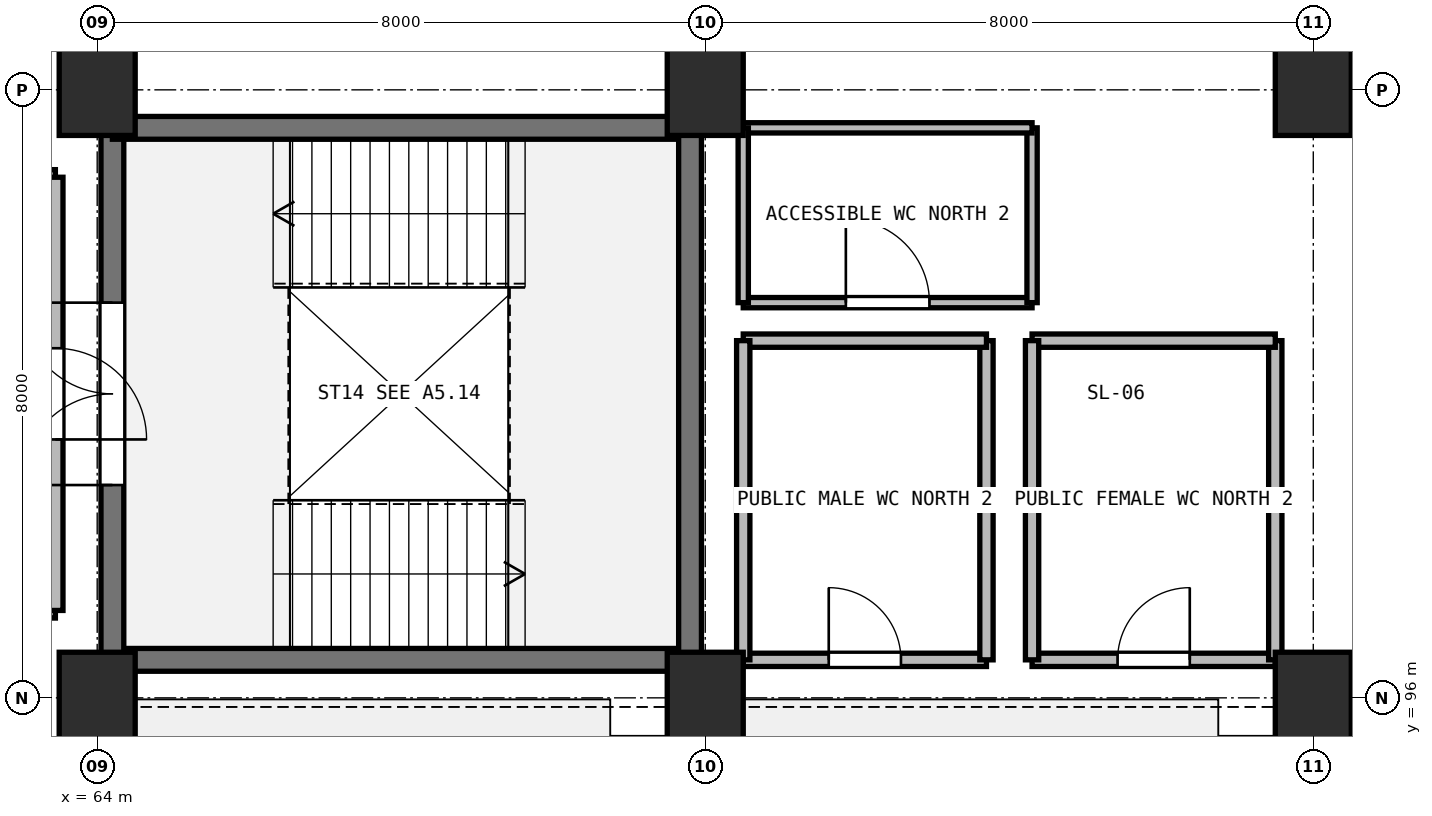
"""IFC4 building model, lengths in metres.
Left out: names, types, materials, properties, quantities, classifications, styles, units other than length and angle.
Written with IfcOpenShell. Run it as: python <this file> out.ifc"""

import sys

from ifc_helpers import new_model, si_unit, direction, frame, frame_2d, origin, origin_2d, place, context, subcontext, project, spatial, rectangle, extrude, element, fill, save


model = new_model("IFC4")
c1 = context("Model", 3, precision=1e-05, world=origin(), true_north=direction((0.0, 1.0)))
c2 = subcontext(c1, "Body", "Model", "MODEL_VIEW")
j1 = project(units=[si_unit("LENGTHUNIT", "METRE"), si_unit("PLANEANGLEUNIT", "RADIAN")], contexts=[c1])
p1 = place(None, origin())
s1 = spatial("IfcSite", under=j1, at=p1, CompositionType="ELEMENT")
p2 = place(p1, origin())
s2 = spatial("IfcBuilding", under=s1, at=p2, CompositionType="ELEMENT")
p3 = place(p2, frame((0.0, 0.0, 15.0)))
s3 = spatial("IfcBuildingStorey", under=s2, at=p3, CompositionType="ELEMENT", Elevation=15.0)
for number, where, z_axis, x_axis in (
    (1, (64.0, 96.0, 0.0), (0.0, 0.0, 1.0), (1.0, 0.0, 0.0)),
    (2, (64.0, 104.0, 0.0), (0.0, 0.0, 1.0), (1.0, 0.0, 0.0)),
    (3, (72.0, 96.0, 0.0), (0.0, 0.0, 1.0), (1.0, 0.0, 0.0)),
    (4, (72.0, 104.0, 0.0), (0.0, 0.0, 1.0), (1.0, 0.0, 0.0)),
    (5, (80.0, 96.0, 0.0), (0.0, 0.0, 1.0), (1.0, 0.0, 0.0)),
    (6, (80.0, 104.0, 0.0), (0.0, 0.0, 1.0), (1.0, 0.0, 0.0)),
):
    element("IfcColumn", number, at=place(p3, frame(where, z_axis=z_axis, x_axis=x_axis)), inside=s3, PredefinedType="COLUMN", context=c2, shape_type="SweptSolid", body=[
        extrude(rectangle(XDim=1.0, YDim=1.2, at=origin_2d()), origin(), (0.0, 0.0, 1.0), 4.8),
    ])
p4 = place(p3, frame((71.8, 96.5, 0.0), z_axis=(0.0, 0.0, 1.0), x_axis=(-1.0, 0.0, 0.0)))
e7 = element("IfcWall", 7, at=p4, inside=s3, PredefinedType="SHEAR", context=c2, shape_type="SweptSolid", body=[
    extrude(rectangle(XDim=7.6, YDim=0.3, at=frame_2d((3.8, 0.0))), origin(), (0.0, 0.0, 1.0), 4.5),
])
p5 = place(p3, frame((64.2, 96.5, 0.0), z_axis=(0.0, 0.0, 1.0), x_axis=(0.0, 1.0, 0.0)))
e8 = element("IfcWall", 8, at=p5, inside=s3, PredefinedType="SHEAR", context=c2, shape_type="SweptSolid", body=[
    extrude(rectangle(XDim=7.0, YDim=0.3, at=frame_2d((3.5, 0.0))), origin(), (0.0, 0.0, 1.0), 4.5),
])
p6 = place(p5, frame((2.3, 0.0, 0.0)))
e9 = element("IfcOpeningElement", 9, at=p6, cuts=e8, PredefinedType="OPENING", context=c2, shape_type="SweptSolid", body=[
    extrude(rectangle(XDim=2.4, YDim=2.2, at=frame_2d((1.2, 1.1))), frame((0.0, 0.16, 0.0), z_axis=(0.0, -1.0, 0.0), x_axis=(1.0, 0.0, 0.0)), (0.0, 0.0, 1.0), 0.32),
])
p7 = place(p3, frame((64.2, 103.5, 0.0), z_axis=(0.0, 0.0, 1.0), x_axis=(1.0, 0.0, 0.0)))
e10 = element("IfcWall", 10, at=p7, inside=s3, PredefinedType="SHEAR", context=c2, shape_type="SweptSolid", body=[
    extrude(rectangle(XDim=7.6, YDim=0.3, at=frame_2d((3.8, 0.0))), origin(), (0.0, 0.0, 1.0), 4.5),
])
p8 = place(p3, frame((71.8, 103.5, 0.0), z_axis=(0.0, 0.0, 1.0), x_axis=(0.0, -1.0, 0.0)))
e11 = element("IfcWall", 11, at=p8, inside=s3, PredefinedType="SHEAR", context=c2, shape_type="SweptSolid", body=[
    extrude(rectangle(XDim=7.0, YDim=0.3, at=frame_2d((3.5, 0.0))), origin(), (0.0, 0.0, 1.0), 4.5),
])
for number, where, z_axis, x_axis in (
    (12, (59.35, 102.85, 0.0), (0.0, 0.0, 1.0), (1.0, 0.0, 0.0)),
    (13, (63.45, 97.15, 0.0), (0.0, 0.0, 1.0), (-1.0, 0.0, 0.0)),
):
    element("IfcWall", number, at=place(p3, frame(where, z_axis=z_axis, x_axis=x_axis)), inside=s3, PredefinedType="PARTITIONING", context=c2, shape_type="SweptSolid", body=[
        extrude(rectangle(XDim=4.1, YDim=0.2, at=frame_2d((2.05, 0.0))), origin(), (0.0, 0.0, 1.0), 4.5),
    ])
p9 = place(p3, frame((63.45, 102.85, 0.0), z_axis=(0.0, 0.0, 1.0), x_axis=(0.0, -1.0, 0.0)))
e14 = element("IfcWall", 14, at=p9, inside=s3, PredefinedType="PARTITIONING", context=c2, shape_type="SweptSolid", body=[
    extrude(rectangle(XDim=5.7, YDim=0.2, at=frame_2d((2.85, 0.0))), origin(), (0.0, 0.0, 1.0), 3.6),
])
p10 = place(p9, frame((2.25, 0.0, 0.0)))
e15 = element("IfcOpeningElement", 15, at=p10, cuts=e14, PredefinedType="OPENING", context=c2, shape_type="SweptSolid", body=[
    extrude(rectangle(XDim=1.2, YDim=2.2, at=frame_2d((0.6, 1.1))), frame((0.0, 0.11, 0.0), z_axis=(0.0, -1.0, 0.0), x_axis=(1.0, 0.0, 0.0)), (0.0, 0.0, 1.0), 0.22),
])
p11 = place(p3, frame((72.5, 96.5, 0.0), z_axis=(0.0, 0.0, 1.0), x_axis=(1.0, 0.0, 0.0)))
e16 = element("IfcWall", 16, at=p11, inside=s3, PredefinedType="PARTITIONING", context=c2, shape_type="SweptSolid", body=[
    extrude(rectangle(XDim=3.2, YDim=0.175, at=frame_2d((1.6, 0.0))), origin(), (0.0, 0.0, 1.0), 3.6),
])
p12 = place(p11, frame((1.125, 0.0, 0.0)))
e17 = element("IfcOpeningElement", 17, at=p12, cuts=e16, PredefinedType="OPENING", context=c2, shape_type="SweptSolid", body=[
    extrude(rectangle(XDim=0.95, YDim=2.15, at=frame_2d((0.475, 1.075))), frame((0.0, 0.098, 0.0), z_axis=(0.0, -1.0, 0.0), x_axis=(1.0, 0.0, 0.0)), (0.0, 0.0, 1.0), 0.195),
])
p13 = place(p3, frame((75.7, 96.5, 0.0), z_axis=(0.0, 0.0, 1.0), x_axis=(0.0, 1.0, 0.0)))
e18 = element("IfcWall", 18, at=p13, inside=s3, PredefinedType="PARTITIONING", context=c2, shape_type="SweptSolid", body=[
    extrude(rectangle(XDim=4.2, YDim=0.175, at=frame_2d((2.1, 0.0))), origin(), (0.0, 0.0, 1.0), 4.5),
])
p14 = place(p3, frame((75.7, 100.7, 0.0), z_axis=(0.0, 0.0, 1.0), x_axis=(-1.0, 0.0, 0.0)))
e19 = element("IfcWall", 19, at=p14, inside=s3, PredefinedType="PARTITIONING", context=c2, shape_type="SweptSolid", body=[
    extrude(rectangle(XDim=3.2, YDim=0.175, at=frame_2d((1.6, 0.0))), origin(), (0.0, 0.0, 1.0), 4.5),
])
p15 = place(p3, frame((72.5, 100.7, 0.0), z_axis=(0.0, 0.0, 1.0), x_axis=(0.0, -1.0, 0.0)))
e20 = element("IfcWall", 20, at=p15, inside=s3, PredefinedType="PARTITIONING", context=c2, shape_type="SweptSolid", body=[
    extrude(rectangle(XDim=4.2, YDim=0.175, at=frame_2d((2.1, 0.0))), origin(), (0.0, 0.0, 1.0), 3.6),
])
p16 = place(p3, frame((76.3, 96.5, 0.0), z_axis=(0.0, 0.0, 1.0), x_axis=(1.0, 0.0, 0.0)))
e21 = element("IfcWall", 21, at=p16, inside=s3, PredefinedType="PARTITIONING", context=c2, shape_type="SweptSolid", body=[
    extrude(rectangle(XDim=3.2, YDim=0.175, at=frame_2d((1.6, 0.0))), origin(), (0.0, 0.0, 1.0), 3.6),
])
p17 = place(p16, frame((1.125, 0.0, 0.0)))
e22 = element("IfcOpeningElement", 22, at=p17, cuts=e21, PredefinedType="OPENING", context=c2, shape_type="SweptSolid", body=[
    extrude(rectangle(XDim=0.95, YDim=2.15, at=frame_2d((0.475, 1.075))), frame((0.0, 0.098, 0.0), z_axis=(0.0, -1.0, 0.0), x_axis=(1.0, 0.0, 0.0)), (0.0, 0.0, 1.0), 0.195),
])
p18 = place(p3, frame((79.5, 96.5, 0.0), z_axis=(0.0, 0.0, 1.0), x_axis=(0.0, 1.0, 0.0)))
e23 = element("IfcWall", 23, at=p18, inside=s3, PredefinedType="PARTITIONING", context=c2, shape_type="SweptSolid", body=[
    extrude(rectangle(XDim=4.2, YDim=0.175, at=frame_2d((2.1, 0.0))), origin(), (0.0, 0.0, 1.0), 3.6),
])
p19 = place(p3, frame((79.5, 100.7, 0.0), z_axis=(0.0, 0.0, 1.0), x_axis=(-1.0, 0.0, 0.0)))
e24 = element("IfcWall", 24, at=p19, inside=s3, PredefinedType="PARTITIONING", context=c2, shape_type="SweptSolid", body=[
    extrude(rectangle(XDim=3.2, YDim=0.175, at=frame_2d((1.6, 0.0))), origin(), (0.0, 0.0, 1.0), 4.5),
])
p20 = place(p3, frame((76.3, 100.7, 0.0), z_axis=(0.0, 0.0, 1.0), x_axis=(0.0, -1.0, 0.0)))
e25 = element("IfcWall", 25, at=p20, inside=s3, PredefinedType="PARTITIONING", context=c2, shape_type="SweptSolid", body=[
    extrude(rectangle(XDim=4.2, YDim=0.175, at=frame_2d((2.1, 0.0))), origin(), (0.0, 0.0, 1.0), 4.5),
])
p21 = place(p3, frame((72.5, 101.2, 0.0), z_axis=(0.0, 0.0, 1.0), x_axis=(1.0, 0.0, 0.0)))
e26 = element("IfcWall", 26, at=p21, inside=s3, PredefinedType="PARTITIONING", context=c2, shape_type="SweptSolid", body=[
    extrude(rectangle(XDim=3.8, YDim=0.135, at=frame_2d((1.9, 0.0))), origin(), (0.0, 0.0, 1.0), 4.5),
])
p22 = place(p21, frame((1.35, 0.0, 0.0)))
e27 = element("IfcOpeningElement", 27, at=p22, cuts=e26, PredefinedType="OPENING", context=c2, shape_type="SweptSolid", body=[
    extrude(rectangle(XDim=1.1, YDim=2.15, at=frame_2d((0.55, 1.075))), frame((0.0, 0.078, 0.0), z_axis=(0.0, -1.0, 0.0), x_axis=(1.0, 0.0, 0.0)), (0.0, 0.0, 1.0), 0.155),
])
p23 = place(p3, frame((76.3, 101.2, 0.0), z_axis=(0.0, 0.0, 1.0), x_axis=(0.0, 1.0, 0.0)))
e28 = element("IfcWall", 28, at=p23, inside=s3, PredefinedType="PARTITIONING", context=c2, shape_type="SweptSolid", body=[
    extrude(rectangle(XDim=2.3, YDim=0.135, at=frame_2d((1.15, 0.0))), origin(), (0.0, 0.0, 1.0), 4.5),
])
p24 = place(p3, frame((76.3, 103.5, 0.0), z_axis=(0.0, 0.0, 1.0), x_axis=(-1.0, 0.0, 0.0)))
e29 = element("IfcWall", 29, at=p24, inside=s3, PredefinedType="PARTITIONING", context=c2, shape_type="SweptSolid", body=[
    extrude(rectangle(XDim=3.8, YDim=0.135, at=frame_2d((1.9, 0.0))), origin(), (0.0, 0.0, 1.0), 3.6),
])
p25 = place(p3, frame((72.5, 103.5, 0.0), z_axis=(0.0, 0.0, 1.0), x_axis=(0.0, -1.0, 0.0)))
e30 = element("IfcWall", 30, at=p25, inside=s3, PredefinedType="PARTITIONING", context=c2, shape_type="SweptSolid", body=[
    extrude(rectangle(XDim=2.3, YDim=0.135, at=frame_2d((1.15, 0.0))), origin(), (0.0, 0.0, 1.0), 3.6),
])
p26 = place(p6, frame((2.4, 0.0, 0.0), z_axis=(0.0, 0.0, 1.0), x_axis=(-1.0, 0.0, 0.0)))
e31 = element("IfcDoor", 31, at=p26, inside=s3, OperationType="DOUBLE_DOOR_SINGLE_SWING", PredefinedType="DOOR", context=c2, shape_type="SweptSolid", body=[
    extrude(rectangle(XDim=2.4, YDim=2.2, at=frame_2d((1.2, 1.1))), frame((0.0, 0.025, 0.0), z_axis=(0.0, -1.0, 0.0), x_axis=(1.0, 0.0, 0.0)), (0.0, 0.0, 1.0), 0.05),
])
fill(e9, e31)
p27 = place(p10, origin())
e32 = element("IfcDoor", 32, at=p27, inside=s3, OperationType="SINGLE_SWING_RIGHT", PredefinedType="DOOR", context=c2, shape_type="SweptSolid", body=[
    extrude(rectangle(XDim=1.2, YDim=2.2, at=frame_2d((0.6, 1.1))), frame((0.0, 0.025, 0.0), z_axis=(0.0, -1.0, 0.0), x_axis=(1.0, 0.0, 0.0)), (0.0, 0.0, 1.0), 0.05),
])
fill(e15, e32)
p28 = place(p12, origin())
e33 = element("IfcDoor", 33, at=p28, inside=s3, OperationType="SINGLE_SWING_LEFT", PredefinedType="DOOR", context=c2, shape_type="SweptSolid", body=[
    extrude(rectangle(XDim=0.95, YDim=2.15, at=frame_2d((0.475, 1.075))), frame((0.0, 0.025, 0.0), z_axis=(0.0, -1.0, 0.0), x_axis=(1.0, 0.0, 0.0)), (0.0, 0.0, 1.0), 0.05),
])
fill(e17, e33)
p29 = place(p17, origin())
e34 = element("IfcDoor", 34, at=p29, inside=s3, OperationType="SINGLE_SWING_RIGHT", PredefinedType="DOOR", context=c2, shape_type="SweptSolid", body=[
    extrude(rectangle(XDim=0.95, YDim=2.15, at=frame_2d((0.475, 1.075))), frame((0.0, 0.025, 0.0), z_axis=(0.0, -1.0, 0.0), x_axis=(1.0, 0.0, 0.0)), (0.0, 0.0, 1.0), 0.05),
])
fill(e22, e34)
p30 = place(p22, origin())
e35 = element("IfcDoor", 35, at=p30, inside=s3, OperationType="SINGLE_SWING_LEFT", PredefinedType="DOOR", context=c2, shape_type="SweptSolid", body=[
    extrude(rectangle(XDim=1.1, YDim=2.15, at=frame_2d((0.55, 1.075))), frame((0.0, 0.025, 0.0), z_axis=(0.0, -1.0, 0.0), x_axis=(1.0, 0.0, 0.0)), (0.0, 0.0, 1.0), 0.05),
])
fill(e27, e35)
save(model, sys.argv[1])
